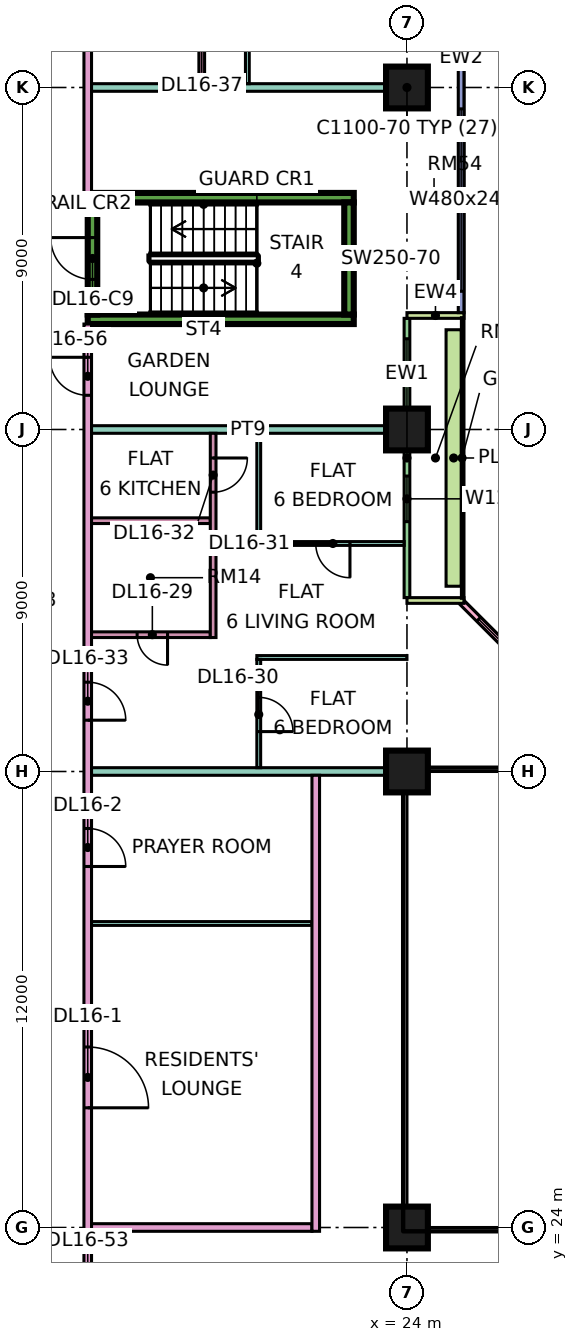
"""IFC4 building model, lengths in metres.
Left out: names, types, materials, properties, quantities, classifications, styles, units other than length and angle.
Written with IfcOpenShell. Run it as: python <this file> out.ifc"""

import sys

from ifc_helpers import new_model, si_unit, direction, frame, frame_2d, origin, origin_2d, place, context, subcontext, project, spatial, rectangle, extrude, element, fill, save


model = new_model("IFC4")
c1 = context("Model", 3, precision=1e-05, world=origin(), true_north=direction((0.0, 1.0)))
c2 = subcontext(c1, "Body", "Model", "MODEL_VIEW")
j1 = project(units=[si_unit("LENGTHUNIT", "METRE"), si_unit("PLANEANGLEUNIT", "RADIAN")], contexts=[c1])
p1 = place(None, origin())
s1 = spatial("IfcSite", under=j1, at=p1, CompositionType="ELEMENT")
p2 = place(p1, origin())
s2 = spatial("IfcBuilding", under=s1, at=p2, CompositionType="ELEMENT")
p3 = place(p2, frame((0.0, 0.0, 75.15)))
s3 = spatial("IfcBuildingStorey", under=s2, at=p3, CompositionType="ELEMENT", Elevation=75.15)
for number, where, z_axis, x_axis in (
    (1, (24.0, 24.0, 0.0), (0.0, 0.0, 1.0), (1.0, 0.0, 0.0)),
    (2, (24.0, 36.0, 0.0), (0.0, 0.0, 1.0), (1.0, 0.0, 0.0)),
    (3, (24.0, 45.0, 0.0), (0.0, 0.0, 1.0), (1.0, 0.0, 0.0)),
    (4, (24.0, 54.0, 0.0), (0.0, 0.0, 1.0), (1.0, 0.0, 0.0)),
):
    element("IfcColumn", number, at=place(p3, frame(where, z_axis=z_axis, x_axis=x_axis)), inside=s3, PredefinedType="COLUMN", context=c2, shape_type="SweptSolid", body=[
        extrude(rectangle(XDim=1.1, YDim=1.1, at=origin_2d()), origin(), (0.0, 0.0, 1.0), 3.75),
    ])
for number, where, z_axis, x_axis in (
    (5, (15.6, 47.9, 0.0), (0.0, 0.0, 1.0), (1.0, 0.0, 0.0)),
    (6, (15.6, 51.1, 0.0), (0.0, 0.0, 1.0), (1.0, 0.0, 0.0)),
):
    element("IfcWall", number, at=place(p3, frame(where, z_axis=z_axis, x_axis=x_axis)), inside=s3, PredefinedType="SHEAR", context=c2, shape_type="SweptSolid", body=[
        extrude(rectangle(XDim=7.0, YDim=0.25, at=frame_2d((3.5, 0.0))), origin(), (0.0, 0.0, 1.0), 3.75),
    ])
p4 = place(p3, frame((15.725, 48.025, 0.0), z_axis=(0.0, 0.0, 1.0), x_axis=(0.0, 1.0, 0.0)))
e7 = element("IfcWall", 7, at=p4, inside=s3, PredefinedType="SHEAR", context=c2, shape_type="SweptSolid", body=[
    extrude(rectangle(XDim=2.95, YDim=0.25, at=frame_2d((1.475, 0.0))), origin(), (0.0, 0.0, 1.0), 3.75),
])
p5 = place(p4, frame((0.925, 0.0, 0.0)))
e8 = element("IfcOpeningElement", 8, at=p5, cuts=e7, PredefinedType="OPENING", context=c2, shape_type="SweptSolid", body=[
    extrude(rectangle(XDim=1.1, YDim=2.2, at=frame_2d((0.55, 1.1))), frame((0.0, 0.135, 0.0), z_axis=(0.0, -1.0, 0.0), x_axis=(1.0, 0.0, 0.0)), (0.0, 0.0, 1.0), 0.27),
])
p6 = place(p3, frame((22.475, 48.025, 0.0), z_axis=(0.0, 0.0, 1.0), x_axis=(0.0, 1.0, 0.0)))
e9 = element("IfcWall", 9, at=p6, inside=s3, PredefinedType="SHEAR", context=c2, shape_type="SweptSolid", body=[
    extrude(rectangle(XDim=2.95, YDim=0.25, at=frame_2d((1.475, 0.0))), origin(), (0.0, 0.0, 1.0), 3.75),
])
p7 = place(p3, frame((28.447, 37.447, 0.0), z_axis=(0.0, 0.0, 1.0), x_axis=(-0.707106781187, 0.707106781187, 0.0)))
e10 = element("IfcWall", 10, at=p7, inside=s3, PredefinedType="SOLIDWALL", context=c2, shape_type="SweptSolid", body=[
    extrude(rectangle(XDim=4.243, YDim=0.15, at=frame_2d((2.121, 0.0))), origin(), (0.0, 0.0, 1.0), 3.35),
])
p8 = place(p7, frame((0.621, 0.0, 0.45)))
e11 = element("IfcOpeningElement", 11, at=p8, cuts=e10, PredefinedType="OPENING", context=c2, shape_type="SweptSolid", body=[
    extrude(rectangle(XDim=3.0, YDim=2.4, at=frame_2d((1.5, 1.2))), frame((0.0, 0.085, 0.0), z_axis=(0.0, -1.0, 0.0), x_axis=(1.0, 0.0, 0.0)), (0.0, 0.0, 1.0), 0.17),
])
p9 = place(p3, frame((24.0, 40.575, 0.0), z_axis=(0.0, 0.0, 1.0), x_axis=(0.0, 1.0, 0.0)))
e12 = element("IfcWall", 12, at=p9, inside=s3, PredefinedType="SOLIDWALL", context=c2, shape_type="SweptSolid", body=[
    extrude(rectangle(XDim=7.35, YDim=0.15, at=frame_2d((3.675, 0.0))), origin(), (0.0, 0.0, 1.0), 3.35),
])
p10 = place(p9, frame((2.0, 0.0, 0.45)))
e13 = element("IfcOpeningElement", 13, at=p10, cuts=e12, PredefinedType="OPENING", context=c2, shape_type="SweptSolid", body=[
    extrude(rectangle(XDim=1.2, YDim=2.4, at=frame_2d((0.6, 1.2))), frame((0.0, 0.085, 0.0), z_axis=(0.0, -1.0, 0.0), x_axis=(1.0, 0.0, 0.0)), (0.0, 0.0, 1.0), 0.17),
])
p11 = place(p9, frame((5.613, 0.0, 0.45)))
e14 = element("IfcOpeningElement", 14, at=p11, cuts=e12, PredefinedType="OPENING", context=c2, shape_type="SweptSolid", body=[
    extrude(rectangle(XDim=1.2, YDim=2.4, at=frame_2d((0.6, 1.2))), frame((0.0, 0.085, 0.0), z_axis=(0.0, -1.0, 0.0), x_axis=(1.0, 0.0, 0.0)), (0.0, 0.0, 1.0), 0.17),
])
for number, where, z_axis, x_axis in (
    (15, (25.5, 40.5, 0.0), (0.0, 0.0, 1.0), (-1.0, 0.0, 0.0)),
    (16, (25.5, 48.0, 0.0), (0.0, 0.0, 1.0), (-1.0, 0.0, 0.0)),
):
    element("IfcWall", number, at=place(p3, frame(where, z_axis=z_axis, x_axis=x_axis)), inside=s3, PredefinedType="SOLIDWALL", context=c2, shape_type="SweptSolid", body=[
        extrude(rectangle(XDim=1.5, YDim=0.15, at=frame_2d((0.75, 0.0))), origin(), (0.0, 0.0, 1.0), 3.35),
    ])
p12 = place(p3, frame((25.425, 48.075, 0.0), z_axis=(0.0, 0.0, 1.0), x_axis=(0.0, 1.0, 0.0)))
e17 = element("IfcWall", 17, at=p12, inside=s3, PredefinedType="SOLIDWALL", context=c2, shape_type="SweptSolid", body=[
    extrude(rectangle(XDim=13.425, YDim=0.15, at=frame_2d((6.712, 0.0))), origin(), (0.0, 0.0, 1.0), 3.35),
])
p13 = place(p12, frame((0.562, 0.0, 0.45)))
e18 = element("IfcOpeningElement", 18, at=p13, cuts=e17, PredefinedType="OPENING", context=c2, shape_type="SweptSolid", body=[
    extrude(rectangle(XDim=4.8, YDim=2.4, at=frame_2d((2.4, 1.2))), frame((0.0, 0.085, 0.0), z_axis=(0.0, -1.0, 0.0), x_axis=(1.0, 0.0, 0.0)), (0.0, 0.0, 1.0), 0.17),
])
p14 = place(p12, frame((6.525, 0.0, 0.45)))
e19 = element("IfcOpeningElement", 19, at=p14, cuts=e17, PredefinedType="OPENING", context=c2, shape_type="SweptSolid", body=[
    extrude(rectangle(XDim=1.8, YDim=2.4, at=frame_2d((0.9, 1.2))), frame((0.0, 0.085, 0.0), z_axis=(0.0, -1.0, 0.0), x_axis=(1.0, 0.0, 0.0)), (0.0, 0.0, 1.0), 0.17),
])
p15 = place(p12, frame((9.525, 0.0, 0.45)))
e20 = element("IfcOpeningElement", 20, at=p15, cuts=e17, PredefinedType="OPENING", context=c2, shape_type="SweptSolid", body=[
    extrude(rectangle(XDim=1.8, YDim=2.4, at=frame_2d((0.9, 1.2))), frame((0.0, 0.085, 0.0), z_axis=(0.0, -1.0, 0.0), x_axis=(1.0, 0.0, 0.0)), (0.0, 0.0, 1.0), 0.17),
])
p16 = place(p3, frame((25.229, 40.875, 0.0), z_axis=(0.0, 0.0, 1.0), x_axis=(0.0, 1.0, 0.0)))
e21 = element("IfcWall", 21, at=p16, inside=s3, PredefinedType="SOLIDWALL", context=c2, shape_type="SweptSolid", body=[
    extrude(rectangle(XDim=6.75, YDim=0.4, at=frame_2d((3.375, 0.0))), origin(), (0.0, 0.0, 1.0), 0.7),
])
p17 = place(p3, frame((15.6, 20.0, 0.0), z_axis=(0.0, 0.0, 1.0), x_axis=(0.0, 1.0, 0.0)))
e22 = element("IfcWall", 22, at=p17, inside=s3, PredefinedType="PARTITIONING", context=c2, shape_type="SweptSolid", body=[
    extrude(rectangle(XDim=27.775, YDim=0.2, at=frame_2d((13.887, 0.0))), origin(), (0.0, 0.0, 1.0), 3.35),
])
p18 = place(p17, frame((7.15, 0.0, 0.0)))
e23 = element("IfcOpeningElement", 23, at=p18, cuts=e22, PredefinedType="OPENING", context=c2, shape_type="SweptSolid", body=[
    extrude(rectangle(XDim=1.6, YDim=2.1, at=frame_2d((0.8, 1.05))), frame((0.0, 0.11, 0.0), z_axis=(0.0, -1.0, 0.0), x_axis=(1.0, 0.0, 0.0)), (0.0, 0.0, 1.0), 0.22),
])
p19 = place(p17, frame((13.5, 0.0, 0.0)))
e24 = element("IfcOpeningElement", 24, at=p19, cuts=e22, PredefinedType="OPENING", context=c2, shape_type="SweptSolid", body=[
    extrude(rectangle(XDim=1.0, YDim=2.1, at=frame_2d((0.5, 1.05))), frame((0.0, 0.11, 0.0), z_axis=(0.0, -1.0, 0.0), x_axis=(1.0, 0.0, 0.0)), (0.0, 0.0, 1.0), 0.22),
])
p20 = place(p17, frame((17.35, 0.0, 0.0)))
e25 = element("IfcOpeningElement", 25, at=p20, cuts=e22, PredefinedType="OPENING", context=c2, shape_type="SweptSolid", body=[
    extrude(rectangle(XDim=1.0, YDim=2.1, at=frame_2d((0.5, 1.05))), frame((0.0, 0.11, 0.0), z_axis=(0.0, -1.0, 0.0), x_axis=(1.0, 0.0, 0.0)), (0.0, 0.0, 1.0), 0.22),
])
p21 = place(p17, frame((1.15, 0.0, 0.0)))
e26 = element("IfcOpeningElement", 26, at=p21, cuts=e22, PredefinedType="OPENING", context=c2, shape_type="SweptSolid", body=[
    extrude(rectangle(XDim=1.8, YDim=2.1, at=frame_2d((0.9, 1.05))), frame((0.0, 0.11, 0.0), z_axis=(0.0, -1.0, 0.0), x_axis=(1.0, 0.0, 0.0)), (0.0, 0.0, 1.0), 0.22),
])
p22 = place(p17, frame((25.9, 0.0, 0.0)))
e27 = element("IfcOpeningElement", 27, at=p22, cuts=e22, PredefinedType="OPENING", context=c2, shape_type="SweptSolid", body=[
    extrude(rectangle(XDim=1.0, YDim=2.1, at=frame_2d((0.5, 1.05))), frame((0.0, 0.11, 0.0), z_axis=(0.0, -1.0, 0.0), x_axis=(1.0, 0.0, 0.0)), (0.0, 0.0, 1.0), 0.22),
])
p23 = place(p3, frame((15.6, 51.225, 0.0), z_axis=(0.0, 0.0, 1.0), x_axis=(0.0, 1.0, 0.0)))
e28 = element("IfcWall", 28, at=p23, inside=s3, PredefinedType="PARTITIONING", context=c2, shape_type="SweptSolid", body=[
    extrude(rectangle(XDim=11.701, YDim=0.2, at=frame_2d((5.851, 0.0))), origin(), (0.0, 0.0, 1.0), 3.35),
])
p24 = place(p23, frame((9.825, 0.0, 0.0)))
e29 = element("IfcOpeningElement", 29, at=p24, cuts=e28, PredefinedType="OPENING", context=c2, shape_type="SweptSolid", body=[
    extrude(rectangle(XDim=1.0, YDim=2.1, at=frame_2d((0.5, 1.05))), frame((0.0, 0.11, 0.0), z_axis=(0.0, -1.0, 0.0), x_axis=(1.0, 0.0, 0.0)), (0.0, 0.0, 1.0), 0.22),
])
p25 = place(p3, frame((15.7, 24.0, 0.0), z_axis=(0.0, 0.0, 1.0), x_axis=(1.0, 0.0, 0.0)))
e30 = element("IfcWall", 30, at=p25, inside=s3, PredefinedType="PARTITIONING", context=c2, shape_type="SweptSolid", body=[
    extrude(rectangle(XDim=5.8, YDim=0.2, at=frame_2d((2.9, 0.0))), origin(), (0.0, 0.0, 1.0), 3.35),
])
p26 = place(p3, frame((15.7, 32.0, 0.0), z_axis=(0.0, 0.0, 1.0), x_axis=(1.0, 0.0, 0.0)))
e31 = element("IfcWall", 31, at=p26, inside=s3, PredefinedType="PARTITIONING", context=c2, shape_type="SweptSolid", body=[
    extrude(rectangle(XDim=5.8, YDim=0.1, at=frame_2d((2.9, 0.0))), origin(), (0.0, 0.0, 1.0), 3.35),
])
p27 = place(p3, frame((15.7, 36.0, 0.0), z_axis=(0.0, 0.0, 1.0), x_axis=(1.0, 0.0, 0.0)))
e32 = element("IfcWall", 32, at=p27, inside=s3, PredefinedType="PARTITIONING", context=c2, shape_type="SweptSolid", body=[
    extrude(rectangle(XDim=8.3, YDim=0.2, at=frame_2d((4.15, 0.0))), origin(), (0.0, 0.0, 1.0), 3.35),
])
p28 = place(p3, frame((15.7, 39.6, 0.0), z_axis=(0.0, 0.0, 1.0), x_axis=(1.0, 0.0, 0.0)))
e33 = element("IfcWall", 33, at=p28, inside=s3, PredefinedType="PARTITIONING", context=c2, shape_type="SweptSolid", body=[
    extrude(rectangle(XDim=3.125, YDim=0.15, at=frame_2d((1.562, 0.0))), origin(), (0.0, 0.0, 1.0), 3.35),
])
p29 = place(p28, frame((1.2, 0.0, 0.0)))
e34 = element("IfcOpeningElement", 34, at=p29, cuts=e33, PredefinedType="OPENING", context=c2, shape_type="SweptSolid", body=[
    extrude(rectangle(XDim=0.8, YDim=2.1, at=frame_2d((0.4, 1.05))), frame((0.0, 0.085, 0.0), z_axis=(0.0, -1.0, 0.0), x_axis=(1.0, 0.0, 0.0)), (0.0, 0.0, 1.0), 0.17),
])
p30 = place(p3, frame((15.7, 42.6, 0.0), z_axis=(0.0, 0.0, 1.0), x_axis=(1.0, 0.0, 0.0)))
e35 = element("IfcWall", 35, at=p30, inside=s3, PredefinedType="PARTITIONING", context=c2, shape_type="SweptSolid", body=[
    extrude(rectangle(XDim=3.125, YDim=0.15, at=frame_2d((1.562, 0.0))), origin(), (0.0, 0.0, 1.0), 3.35),
])
p31 = place(p3, frame((15.7, 45.0, 0.0), z_axis=(0.0, 0.0, 1.0), x_axis=(1.0, 0.0, 0.0)))
e36 = element("IfcWall", 36, at=p31, inside=s3, PredefinedType="PARTITIONING", context=c2, shape_type="SweptSolid", body=[
    extrude(rectangle(XDim=8.226, YDim=0.2, at=frame_2d((4.113, 0.0))), origin(), (0.0, 0.0, 1.0), 3.35),
])
p32 = place(p3, frame((15.7, 54.0, 0.0), z_axis=(0.0, 0.0, 1.0), x_axis=(1.0, 0.0, 0.0)))
e37 = element("IfcWall", 37, at=p32, inside=s3, PredefinedType="PARTITIONING", context=c2, shape_type="SweptSolid", body=[
    extrude(rectangle(XDim=8.3, YDim=0.2, at=frame_2d((4.15, 0.0))), origin(), (0.0, 0.0, 1.0), 3.35),
])
p33 = place(p3, frame((18.6, 54.1, 0.0), z_axis=(0.0, 0.0, 1.0), x_axis=(0.0, 1.0, 0.0)))
e38 = element("IfcWall", 38, at=p33, inside=s3, PredefinedType="PARTITIONING", context=c2, shape_type="SweptSolid", body=[
    extrude(rectangle(XDim=5.975, YDim=0.15, at=frame_2d((2.987, 0.0))), origin(), (0.0, 0.0, 1.0), 3.35),
])
p34 = place(p33, frame((1.1, 0.0, 0.0)))
e39 = element("IfcOpeningElement", 39, at=p34, cuts=e38, PredefinedType="OPENING", context=c2, shape_type="SweptSolid", body=[
    extrude(rectangle(XDim=0.9, YDim=2.1, at=frame_2d((0.45, 1.05))), frame((0.0, 0.085, 0.0), z_axis=(0.0, -1.0, 0.0), x_axis=(1.0, 0.0, 0.0)), (0.0, 0.0, 1.0), 0.17),
])
p35 = place(p3, frame((18.9, 39.525, 0.0), z_axis=(0.0, 0.0, 1.0), x_axis=(0.0, 1.0, 0.0)))
e40 = element("IfcWall", 40, at=p35, inside=s3, PredefinedType="PARTITIONING", context=c2, shape_type="SweptSolid", body=[
    extrude(rectangle(XDim=5.375, YDim=0.15, at=frame_2d((2.688, 0.0))), origin(), (0.0, 0.0, 1.0), 3.35),
])
p36 = place(p35, frame((3.825, 0.0, 0.0)))
e41 = element("IfcOpeningElement", 41, at=p36, cuts=e40, PredefinedType="OPENING", context=c2, shape_type="SweptSolid", body=[
    extrude(rectangle(XDim=0.9, YDim=2.1, at=frame_2d((0.45, 1.05))), frame((0.0, 0.085, 0.0), z_axis=(0.0, -1.0, 0.0), x_axis=(1.0, 0.0, 0.0)), (0.0, 0.0, 1.0), 0.17),
])
p37 = place(p3, frame((19.8, 54.1, 0.0), z_axis=(0.0, 0.0, 1.0), x_axis=(0.0, 1.0, 0.0)))
e42 = element("IfcWall", 42, at=p37, inside=s3, PredefinedType="PARTITIONING", context=c2, shape_type="SweptSolid", body=[
    extrude(rectangle(XDim=5.95, YDim=0.1, at=frame_2d((2.975, 0.0))), origin(), (0.0, 0.0, 1.0), 3.35),
])
p38 = place(p37, frame((0.95, 0.0, 0.0)))
e43 = element("IfcOpeningElement", 43, at=p38, cuts=e42, PredefinedType="OPENING", context=c2, shape_type="SweptSolid", body=[
    extrude(rectangle(XDim=0.9, YDim=2.1, at=frame_2d((0.45, 1.05))), frame((0.0, 0.06, 0.0), z_axis=(0.0, -1.0, 0.0), x_axis=(1.0, 0.0, 0.0)), (0.0, 0.0, 1.0), 0.12),
])
p39 = place(p3, frame((20.05, 39.0, 0.0), z_axis=(0.0, 0.0, 1.0), x_axis=(1.0, 0.0, 0.0)))
e44 = element("IfcWall", 44, at=p39, inside=s3, PredefinedType="PARTITIONING", context=c2, shape_type="SweptSolid", body=[
    extrude(rectangle(XDim=3.95, YDim=0.1, at=frame_2d((1.975, 0.0))), origin(), (0.0, 0.0, 1.0), 3.35),
])
p40 = place(p3, frame((20.05, 42.0, 0.0), z_axis=(0.0, 0.0, 1.0), x_axis=(1.0, 0.0, 0.0)))
e45 = element("IfcWall", 45, at=p40, inside=s3, PredefinedType="PARTITIONING", context=c2, shape_type="SweptSolid", body=[
    extrude(rectangle(XDim=3.876, YDim=0.1, at=frame_2d((1.938, 0.0))), origin(), (0.0, 0.0, 1.0), 3.35),
])
p41 = place(p40, frame((1.55, 0.0, 0.0)))
e46 = element("IfcOpeningElement", 46, at=p41, cuts=e45, PredefinedType="OPENING", context=c2, shape_type="SweptSolid", body=[
    extrude(rectangle(XDim=0.9, YDim=2.1, at=frame_2d((0.45, 1.05))), frame((0.0, 0.06, 0.0), z_axis=(0.0, -1.0, 0.0), x_axis=(1.0, 0.0, 0.0)), (0.0, 0.0, 1.0), 0.12),
])
p42 = place(p3, frame((20.1, 36.1, 0.0), z_axis=(0.0, 0.0, 1.0), x_axis=(0.0, 1.0, 0.0)))
e47 = element("IfcWall", 47, at=p42, inside=s3, PredefinedType="PARTITIONING", context=c2, shape_type="SweptSolid", body=[
    extrude(rectangle(XDim=2.85, YDim=0.1, at=frame_2d((1.425, 0.0))), origin(), (0.0, 0.0, 1.0), 3.35),
])
p43 = place(p42, frame((0.95, 0.0, 0.0)))
e48 = element("IfcOpeningElement", 48, at=p43, cuts=e47, PredefinedType="OPENING", context=c2, shape_type="SweptSolid", body=[
    extrude(rectangle(XDim=0.9, YDim=2.1, at=frame_2d((0.45, 1.05))), frame((0.0, 0.06, 0.0), z_axis=(0.0, -1.0, 0.0), x_axis=(1.0, 0.0, 0.0)), (0.0, 0.0, 1.0), 0.12),
])
p44 = place(p3, frame((20.1, 42.05, 0.0), z_axis=(0.0, 0.0, 1.0), x_axis=(0.0, 1.0, 0.0)))
e49 = element("IfcWall", 49, at=p44, inside=s3, PredefinedType="PARTITIONING", context=c2, shape_type="SweptSolid", body=[
    extrude(rectangle(XDim=2.85, YDim=0.1, at=frame_2d((1.425, 0.0))), origin(), (0.0, 0.0, 1.0), 3.35),
])
p45 = place(p3, frame((21.6, 23.9, 0.0), z_axis=(0.0, 0.0, 1.0), x_axis=(0.0, 1.0, 0.0)))
e50 = element("IfcWall", 50, at=p45, inside=s3, PredefinedType="PARTITIONING", context=c2, shape_type="SweptSolid", body=[
    extrude(rectangle(XDim=12.0, YDim=0.2, at=frame_2d((6.0, 0.0))), origin(), (0.0, 0.0, 1.0), 3.35),
])
p46 = place(p8, origin())
e51 = element("IfcWindow", 51, at=p46, inside=s3, PartitioningType="SINGLE_PANEL", PredefinedType="WINDOW", context=c2, shape_type="SweptSolid", body=[
    extrude(rectangle(XDim=3.0, YDim=2.4, at=frame_2d((1.5, 1.2))), frame((0.0, 0.03, 0.0), z_axis=(0.0, -1.0, 0.0), x_axis=(1.0, 0.0, 0.0)), (0.0, 0.0, 1.0), 0.06),
])
fill(e11, e51)
p47 = place(p10, origin())
e52 = element("IfcWindow", 52, at=p47, inside=s3, PartitioningType="SINGLE_PANEL", PredefinedType="WINDOW", context=c2, shape_type="SweptSolid", body=[
    extrude(rectangle(XDim=1.2, YDim=2.4, at=frame_2d((0.6, 1.2))), frame((0.0, 0.03, 0.0), z_axis=(0.0, -1.0, 0.0), x_axis=(1.0, 0.0, 0.0)), (0.0, 0.0, 1.0), 0.06),
])
fill(e13, e52)
p48 = place(p11, origin())
e53 = element("IfcWindow", 53, at=p48, inside=s3, PartitioningType="SINGLE_PANEL", PredefinedType="WINDOW", context=c2, shape_type="SweptSolid", body=[
    extrude(rectangle(XDim=1.2, YDim=2.4, at=frame_2d((0.6, 1.2))), frame((0.0, 0.03, 0.0), z_axis=(0.0, -1.0, 0.0), x_axis=(1.0, 0.0, 0.0)), (0.0, 0.0, 1.0), 0.06),
])
fill(e14, e53)
p49 = place(p13, origin())
e54 = element("IfcWindow", 54, at=p49, inside=s3, PartitioningType="SINGLE_PANEL", PredefinedType="WINDOW", context=c2, shape_type="SweptSolid", body=[
    extrude(rectangle(XDim=4.8, YDim=2.4, at=frame_2d((2.4, 1.2))), frame((0.0, 0.03, 0.0), z_axis=(0.0, -1.0, 0.0), x_axis=(1.0, 0.0, 0.0)), (0.0, 0.0, 1.0), 0.06),
])
fill(e18, e54)
p50 = place(p14, origin())
e55 = element("IfcWindow", 55, at=p50, inside=s3, PartitioningType="SINGLE_PANEL", PredefinedType="WINDOW", context=c2, shape_type="SweptSolid", body=[
    extrude(rectangle(XDim=1.8, YDim=2.4, at=frame_2d((0.9, 1.2))), frame((0.0, 0.03, 0.0), z_axis=(0.0, -1.0, 0.0), x_axis=(1.0, 0.0, 0.0)), (0.0, 0.0, 1.0), 0.06),
])
fill(e19, e55)
p51 = place(p5, frame((1.1, 0.0, 0.0), z_axis=(0.0, 0.0, 1.0), x_axis=(-1.0, 0.0, 0.0)))
e56 = element("IfcDoor", 56, at=p51, inside=s3, OperationType="SINGLE_SWING_RIGHT", PredefinedType="DOOR", context=c2, shape_type="SweptSolid", body=[
    extrude(rectangle(XDim=1.1, YDim=2.2, at=frame_2d((0.55, 1.1))), frame((0.0, 0.025, 0.0), z_axis=(0.0, -1.0, 0.0), x_axis=(1.0, 0.0, 0.0)), (0.0, 0.0, 1.0), 0.05),
])
fill(e8, e56)
p52 = place(p18, frame((1.6, 0.0, 0.0), z_axis=(0.0, 0.0, 1.0), x_axis=(-1.0, 0.0, 0.0)))
e57 = element("IfcDoor", 57, at=p52, inside=s3, OperationType="DOUBLE_DOOR_SINGLE_SWING", PredefinedType="DOOR", context=c2, shape_type="SweptSolid", body=[
    extrude(rectangle(XDim=1.6, YDim=2.1, at=frame_2d((0.8, 1.05))), frame((0.0, 0.025, 0.0), z_axis=(0.0, -1.0, 0.0), x_axis=(1.0, 0.0, 0.0)), (0.0, 0.0, 1.0), 0.05),
])
fill(e23, e57)
p53 = place(p19, frame((1.0, 0.0, 0.0), z_axis=(0.0, 0.0, 1.0), x_axis=(-1.0, 0.0, 0.0)))
e58 = element("IfcDoor", 58, at=p53, inside=s3, OperationType="SINGLE_SWING_LEFT", PredefinedType="DOOR", context=c2, shape_type="SweptSolid", body=[
    extrude(rectangle(XDim=1.0, YDim=2.1, at=frame_2d((0.5, 1.05))), frame((0.0, 0.025, 0.0), z_axis=(0.0, -1.0, 0.0), x_axis=(1.0, 0.0, 0.0)), (0.0, 0.0, 1.0), 0.05),
])
fill(e24, e58)
p54 = place(p29, origin())
e59 = element("IfcDoor", 59, at=p54, inside=s3, OperationType="SINGLE_SWING_RIGHT", PredefinedType="DOOR", context=c2, shape_type="SweptSolid", body=[
    extrude(rectangle(XDim=0.8, YDim=2.1, at=frame_2d((0.4, 1.05))), frame((0.0, 0.025, 0.0), z_axis=(0.0, -1.0, 0.0), x_axis=(1.0, 0.0, 0.0)), (0.0, 0.0, 1.0), 0.05),
])
fill(e34, e59)
p55 = place(p43, frame((0.9, 0.0, 0.0), z_axis=(0.0, 0.0, 1.0), x_axis=(-1.0, 0.0, 0.0)))
e60 = element("IfcDoor", 60, at=p55, inside=s3, OperationType="SINGLE_SWING_LEFT", PredefinedType="DOOR", context=c2, shape_type="SweptSolid", body=[
    extrude(rectangle(XDim=0.9, YDim=2.1, at=frame_2d((0.45, 1.05))), frame((0.0, 0.025, 0.0), z_axis=(0.0, -1.0, 0.0), x_axis=(1.0, 0.0, 0.0)), (0.0, 0.0, 1.0), 0.05),
])
fill(e48, e60)
p56 = place(p41, origin())
e61 = element("IfcDoor", 61, at=p56, inside=s3, OperationType="SINGLE_SWING_RIGHT", PredefinedType="DOOR", context=c2, shape_type="SweptSolid", body=[
    extrude(rectangle(XDim=0.9, YDim=2.1, at=frame_2d((0.45, 1.05))), frame((0.0, 0.025, 0.0), z_axis=(0.0, -1.0, 0.0), x_axis=(1.0, 0.0, 0.0)), (0.0, 0.0, 1.0), 0.05),
])
fill(e46, e61)
p57 = place(p36, origin())
e62 = element("IfcDoor", 62, at=p57, inside=s3, OperationType="SINGLE_SWING_RIGHT", PredefinedType="DOOR", context=c2, shape_type="SweptSolid", body=[
    extrude(rectangle(XDim=0.9, YDim=2.1, at=frame_2d((0.45, 1.05))), frame((0.0, 0.025, 0.0), z_axis=(0.0, -1.0, 0.0), x_axis=(1.0, 0.0, 0.0)), (0.0, 0.0, 1.0), 0.05),
])
fill(e41, e62)
p58 = place(p20, frame((1.0, 0.0, 0.0), z_axis=(0.0, 0.0, 1.0), x_axis=(-1.0, 0.0, 0.0)))
e63 = element("IfcDoor", 63, at=p58, inside=s3, OperationType="SINGLE_SWING_LEFT", PredefinedType="DOOR", context=c2, shape_type="SweptSolid", body=[
    extrude(rectangle(XDim=1.0, YDim=2.1, at=frame_2d((0.5, 1.05))), frame((0.0, 0.025, 0.0), z_axis=(0.0, -1.0, 0.0), x_axis=(1.0, 0.0, 0.0)), (0.0, 0.0, 1.0), 0.05),
])
fill(e25, e63)
p59 = place(p22, frame((1.0, 0.0, 0.0), z_axis=(0.0, 0.0, 1.0), x_axis=(-1.0, 0.0, 0.0)))
e64 = element("IfcDoor", 64, at=p59, inside=s3, OperationType="SINGLE_SWING_RIGHT", PredefinedType="DOOR", context=c2, shape_type="SweptSolid", body=[
    extrude(rectangle(XDim=1.0, YDim=2.1, at=frame_2d((0.5, 1.05))), frame((0.0, 0.025, 0.0), z_axis=(0.0, -1.0, 0.0), x_axis=(1.0, 0.0, 0.0)), (0.0, 0.0, 1.0), 0.05),
])
fill(e27, e64)
save(model, sys.argv[1])
